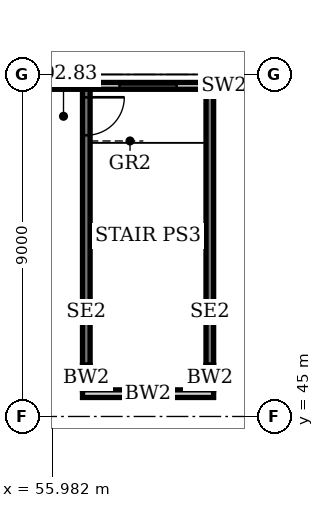
"""IFC4 building model, lengths in metres.
Left out: names, types, materials, properties, quantities, classifications, styles, units other than length and angle.
Written with IfcOpenShell. Run it as: python <this file> out.ifc"""

import sys

from ifc_helpers import new_model, si_unit, direction, frame, frame_2d, origin, place, context, subcontext, project, spatial, rectangle, extrude, element, fill, save


model = new_model("IFC4")
c1 = context("Model", 3, precision=1e-05, world=origin(), true_north=direction((0.0, 1.0)))
c2 = subcontext(c1, "Body", "Model", "MODEL_VIEW")
j1 = project(units=[si_unit("LENGTHUNIT", "METRE"), si_unit("PLANEANGLEUNIT", "RADIAN")], contexts=[c1])
p1 = place(None, origin())
s1 = spatial("IfcSite", under=j1, at=p1, CompositionType="ELEMENT")
p2 = place(p1, origin())
s2 = spatial("IfcBuilding", under=s1, at=p2, CompositionType="ELEMENT")
p3 = place(p2, frame((0.0, 0.0, 10.8)))
s3 = spatial("IfcBuildingStorey", under=s2, at=p3, CompositionType="ELEMENT", Elevation=10.8)
p4 = place(p3, frame((55.3, 53.7, 0.0), z_axis=(0.0, 0.0, 1.0), x_axis=(1.0, 0.0, 0.0)))
e1 = element("IfcWall", 1, at=p4, inside=s3, PredefinedType="SOLIDWALL", context=c2, shape_type="SweptSolid", body=[
    extrude(rectangle(XDim=6.4, YDim=0.18, at=frame_2d((3.2, 0.0))), origin(), (0.0, 0.0, 1.0), 3.8),
])
p5 = place(p4, frame((2.45, 0.0, 0.3)))
e2 = element("IfcOpeningElement", 2, at=p5, cuts=e1, PredefinedType="OPENING", context=c2, shape_type="SweptSolid", body=[
    extrude(rectangle(XDim=1.5, YDim=2.4, at=frame_2d((0.75, 1.2))), frame((0.0, 0.1, 0.0), z_axis=(0.0, -1.0, 0.0), x_axis=(1.0, 0.0, 0.0)), (0.0, 0.0, 1.0), 0.2),
])
p6 = place(p3, frame((56.875, 53.61, 0.0), z_axis=(0.0, 0.0, 1.0), x_axis=(0.0, -1.0, 0.0)))
e3 = element("IfcWall", 3, at=p6, inside=s3, PredefinedType="SOLIDWALL", context=c2, shape_type="SweptSolid", body=[
    extrude(rectangle(XDim=7.26, YDim=0.2, at=frame_2d((3.63, 0.0))), origin(), (0.0, 0.0, 1.0), 4.6),
])
p7 = place(p6, frame((0.21, 0.0, 0.0)))
e4 = element("IfcOpeningElement", 4, at=p7, cuts=e3, PredefinedType="OPENING", context=c2, shape_type="SweptSolid", body=[
    extrude(rectangle(XDim=1.0, YDim=2.4, at=frame_2d((0.5, 1.2))), frame((0.0, 0.11, 0.0), z_axis=(0.0, -1.0, 0.0), x_axis=(1.0, 0.0, 0.0)), (0.0, 0.0, 1.0), 0.22),
])
p8 = place(p3, frame((60.125, 53.61, 0.0), z_axis=(0.0, 0.0, 1.0), x_axis=(0.0, -1.0, 0.0)))
e5 = element("IfcWall", 5, at=p8, inside=s3, PredefinedType="SOLIDWALL", context=c2, shape_type="SweptSolid", body=[
    extrude(rectangle(XDim=7.26, YDim=0.2, at=frame_2d((3.63, 0.0))), origin(), (0.0, 0.0, 1.0), 4.6),
])
for number, where, z_axis, x_axis in (
    (6, (56.875, 46.35, 0.0), (0.0, 0.0, 1.0), (0.0, -1.0, 0.0)),
    (7, (60.125, 46.35, 0.0), (0.0, 0.0, 1.0), (0.0, -1.0, 0.0)),
):
    element("IfcWall", number, at=place(p3, frame(where, z_axis=z_axis, x_axis=x_axis)), inside=s3, PredefinedType="SOLIDWALL", context=c2, shape_type="SweptSolid", body=[
        extrude(rectangle(XDim=0.65, YDim=0.2, at=frame_2d((0.325, 0.0))), origin(), (0.0, 0.0, 1.0), 4.6),
    ])
p9 = place(p3, frame((56.775, 45.6, 0.0), z_axis=(0.0, 0.0, 1.0), x_axis=(1.0, 0.0, 0.0)))
e8 = element("IfcWall", 8, at=p9, inside=s3, PredefinedType="SOLIDWALL", context=c2, shape_type="SweptSolid", body=[
    extrude(rectangle(XDim=3.45, YDim=0.2, at=frame_2d((1.725, 0.0))), origin(), (0.0, 0.0, 1.0), 4.6),
])
p10 = place(p5, origin())
e9 = element("IfcWindow", 9, at=p10, inside=s3, PartitioningType="SINGLE_PANEL", PredefinedType="WINDOW", context=c2, shape_type="SweptSolid", body=[
    extrude(rectangle(XDim=1.5, YDim=2.4, at=frame_2d((0.75, 1.2))), frame((0.0, 0.03, 0.0), z_axis=(0.0, -1.0, 0.0), x_axis=(1.0, 0.0, 0.0)), (0.0, 0.0, 1.0), 0.06),
])
fill(e2, e9)
p11 = place(p7, origin())
e10 = element("IfcDoor", 10, at=p11, inside=s3, OperationType="SINGLE_SWING_RIGHT", PredefinedType="DOOR", context=c2, shape_type="SweptSolid", body=[
    extrude(rectangle(XDim=1.0, YDim=2.4, at=frame_2d((0.5, 1.2))), frame((0.0, 0.03, 0.0), z_axis=(0.0, -1.0, 0.0), x_axis=(1.0, 0.0, 0.0)), (0.0, 0.0, 1.0), 0.06),
])
fill(e4, e10)
save(model, sys.argv[1])
